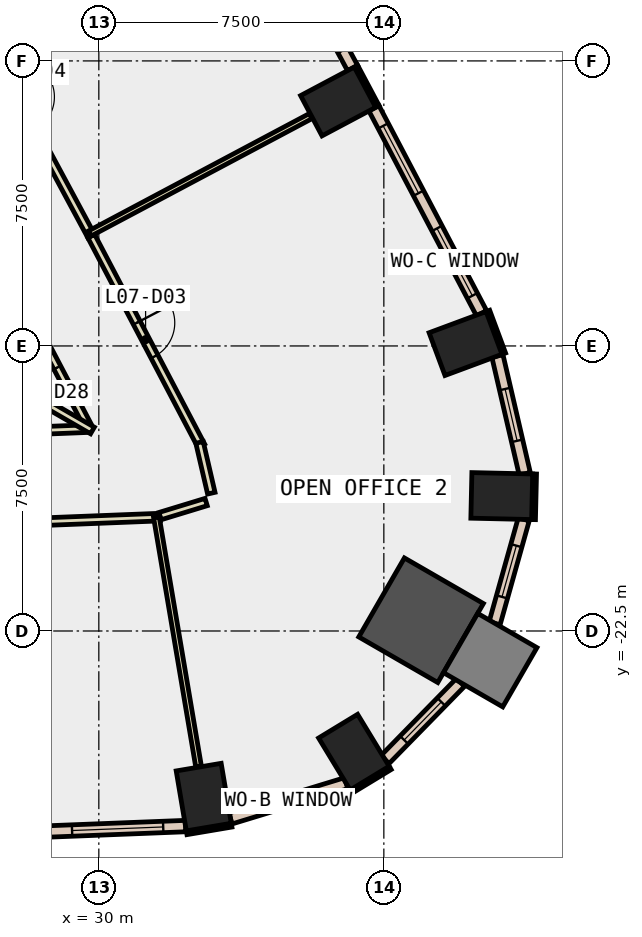
"""IFC4 building model, lengths in metres.
Left out: names, types, materials, properties, quantities, classifications, styles, units other than length and angle.
Written with IfcOpenShell. Run it as: python <this file> out.ifc"""

import sys

from ifc_helpers import new_model, si_unit, direction, frame, frame_2d, origin, origin_2d, place, context, subcontext, project, spatial, rectangle, extrude, element, fill, save


model = new_model("IFC4")
c1 = context("Model", 3, precision=1e-05, world=origin(), true_north=direction((0.0, 1.0)))
c2 = subcontext(c1, "Body", "Model", "MODEL_VIEW")
j1 = project(units=[si_unit("LENGTHUNIT", "METRE"), si_unit("PLANEANGLEUNIT", "RADIAN")], contexts=[c1])
p1 = place(None, origin())
s1 = spatial("IfcSite", under=j1, at=p1, CompositionType="ELEMENT")
p2 = place(p1, origin())
s2 = spatial("IfcBuilding", under=s1, at=p2, CompositionType="ELEMENT")
p3 = place(p2, frame((0.0, 0.0, 39.2)))
s3 = spatial("IfcBuildingStorey", under=s2, at=p3, CompositionType="ELEMENT", Elevation=39.2)
for number, where, z_axis, x_axis in (
    (1, (32.761, -26.871, -0.4), (0.0, 0.0, 1.0), (0.986, 0.167, 0.0)),
    (2, (36.712, -25.688, -0.4), (0.0, 0.0, 1.0), (0.855, 0.519, 0.0)),
):
    element("IfcColumn", number, at=place(p3, frame(where, z_axis=z_axis, x_axis=x_axis)), inside=s3, PredefinedType="COLUMN", context=c2, shape_type="SweptSolid", body=[
        extrude(rectangle(XDim=1.2, YDim=1.6, at=origin_2d()), origin(), (0.0, 0.0, 1.0), 4.2),
    ])
p4 = place(p3, frame((38.48, -22.217, -0.4), z_axis=(0.0, 0.0, 1.0), x_axis=(-0.866025403784, 0.5, 0.0)))
e3 = element("IfcColumn", 3, at=p4, inside=s3, PredefinedType="COLUMN", context=c2, shape_type="SweptSolid", body=[
    extrude(rectangle(XDim=2.4, YDim=2.4, at=origin_2d()), origin(), (0.0, 0.0, 1.0), 4.2),
])
for number, where, z_axis, x_axis in (
    (4, (40.603, -18.95, -0.4), (0.0, 0.0, 1.0), (0.023, 1.0, 0.0)),
    (5, (39.65, -14.936, -0.4), (0.0, 0.0, 1.0), (-0.348, 0.937, 0.0)),
    (6, (36.298, -8.567, -0.4), (0.0, 0.0, 1.0), (-0.469, 0.883, 0.0)),
):
    element("IfcColumn", number, at=place(p3, frame(where, z_axis=z_axis, x_axis=x_axis)), inside=s3, PredefinedType="COLUMN", context=c2, shape_type="SweptSolid", body=[
        extrude(rectangle(XDim=1.2, YDim=1.6, at=origin_2d()), origin(), (0.0, 0.0, 1.0), 4.2),
    ])
p5 = place(p3, frame((40.299, -23.267, -0.4), z_axis=(0.0, 0.0, 1.0), x_axis=(-0.866025403784, 0.5, 0.0)))
e7 = element("IfcColumn", 7, at=p5, inside=s3, PredefinedType="COLUMN", context=c2, shape_type="SweptSolid", body=[
    extrude(rectangle(XDim=1.8, YDim=1.8, at=origin_2d()), origin(), (0.0, 0.0, 1.0), 4.2),
])
p6 = place(p3, frame((40.656, -15.203, 0.0), z_axis=(0.0, 0.0, 1.0), x_axis=(-0.348268249601, 0.937394914814, 0.0)))
e8 = element("IfcWall", 8, at=p6, inside=s3, PredefinedType="STANDARD", context=c2, shape_type="SweptSolid", body=[
    extrude(rectangle(XDim=1.2, YDim=0.1, at=frame_2d((0.6, 0.0))), origin(), (0.0, 0.0, 1.0), 3.8),
])
p7 = place(p3, frame((37.33, -8.698, 0.0), z_axis=(0.0, 0.0, 1.0), x_axis=(-0.469383408131, 0.882994459876, 0.0)))
e9 = element("IfcWall", 9, at=p7, inside=s3, PredefinedType="STANDARD", context=c2, shape_type="SweptSolid", body=[
    extrude(rectangle(XDim=1.199, YDim=0.1, at=frame_2d((0.6, 0.0))), origin(), (0.0, 0.0, 1.0), 3.8),
])
p8 = place(p3, frame((32.311, -27.809, 0.0), z_axis=(0.0, 0.0, 1.0), x_axis=(0.98597830993, 0.166873522011, 0.0)))
e10 = element("IfcWall", 10, at=p8, inside=s3, PredefinedType="STANDARD", context=c2, shape_type="SweptSolid", body=[
    extrude(rectangle(XDim=1.2, YDim=0.1, at=frame_2d((0.6, 0.0))), origin(), (0.0, 0.0, 1.0), 3.8),
])
for number, where, z_axis, x_axis in (
    (11, (36.64, -26.726, 0.0), (0.0, 0.0, 1.0), (0.855, 0.519, 0.0)),
    (12, (41.439, -19.569, 0.0), (0.0, 0.0, 1.0), (0.023, 1.0, 0.0)),
):
    element("IfcWall", number, at=place(p3, frame(where, z_axis=z_axis, x_axis=x_axis)), inside=s3, PredefinedType="STANDARD", context=c2, shape_type="SweptSolid", body=[
        extrude(rectangle(XDim=1.2, YDim=0.1, at=frame_2d((0.6, 0.0))), origin(), (0.0, 0.0, 1.0), 3.8),
    ])
p9 = place(p3, frame((25.134, -27.914, 0.0), z_axis=(0.0, 0.0, 1.0), x_axis=(0.999228146648, 0.039282450878, 0.0)))
e13 = element("IfcWall", 13, at=p9, inside=s3, PredefinedType="STANDARD", context=c2, shape_type="SweptSolid", body=[
    extrude(rectangle(XDim=7.154, YDim=0.3, at=frame_2d((3.577, 0.0))), origin(), (0.0, 0.0, 1.0), 3.8),
])
p10 = place(p9, frame((0.588, 0.0, 0.9)))
e14 = element("IfcOpeningElement", 14, at=p10, cuts=e13, PredefinedType="OPENING", context=c2, shape_type="SweptSolid", body=[
    extrude(rectangle(XDim=2.4, YDim=2.6, at=frame_2d((1.2, 1.3))), frame((0.0, 0.16, 0.0), z_axis=(0.0, -1.0, 0.0), x_axis=(1.0, 0.0, 0.0)), (0.0, 0.0, 1.0), 0.32),
])
p11 = place(p9, frame((4.165, 0.0, 0.9)))
e15 = element("IfcOpeningElement", 15, at=p11, cuts=e13, PredefinedType="OPENING", context=c2, shape_type="SweptSolid", body=[
    extrude(rectangle(XDim=2.4, YDim=2.6, at=frame_2d((1.2, 1.3))), frame((0.0, 0.16, 0.0), z_axis=(0.0, -1.0, 0.0), x_axis=(1.0, 0.0, 0.0)), (0.0, 0.0, 1.0), 0.32),
])
p12 = place(p3, frame((33.464, -27.433, 0.0), z_axis=(0.0, 0.0, 1.0), x_axis=(0.95648967224, 0.291766185322, 0.0)))
e16 = element("IfcWall", 16, at=p12, inside=s3, PredefinedType="STANDARD", context=c2, shape_type="SweptSolid", body=[
    extrude(rectangle(XDim=3.181, YDim=0.3, at=frame_2d((1.591, 0.0))), origin(), (0.0, 0.0, 1.0), 3.8),
])
p13 = place(p12, frame((0.891, 0.0, 0.9)))
e17 = element("IfcOpeningElement", 17, at=p13, cuts=e16, PredefinedType="OPENING", context=c2, shape_type="SweptSolid", body=[
    extrude(rectangle(XDim=1.4, YDim=2.6, at=frame_2d((0.7, 1.3))), frame((0.0, 0.16, 0.0), z_axis=(0.0, -1.0, 0.0), x_axis=(1.0, 0.0, 0.0)), (0.0, 0.0, 1.0), 0.32),
])
p14 = place(p3, frame((37.531, -25.883, 0.0), z_axis=(0.0, 0.0, 1.0), x_axis=(0.699151821451, 0.714973237654, 0.0)))
e18 = element("IfcWall", 18, at=p14, inside=s3, PredefinedType="STANDARD", context=c2, shape_type="SweptSolid", body=[
    extrude(rectangle(XDim=2.839, YDim=0.3, at=frame_2d((1.42, 0.0))), origin(), (0.0, 0.0, 1.0), 3.8),
])
p15 = place(p14, frame((0.72, 0.0, 0.9)))
e19 = element("IfcOpeningElement", 19, at=p15, cuts=e18, PredefinedType="OPENING", context=c2, shape_type="SweptSolid", body=[
    extrude(rectangle(XDim=1.4, YDim=2.6, at=frame_2d((0.7, 1.3))), frame((0.0, 0.16, 0.0), z_axis=(0.0, -1.0, 0.0), x_axis=(1.0, 0.0, 0.0)), (0.0, 0.0, 1.0), 0.32),
])
p16 = place(p3, frame((40.415, -22.296, 0.0), z_axis=(0.0, 0.0, 1.0), x_axis=(0.269754317033, 0.962929181426, 0.0)))
e20 = element("IfcWall", 20, at=p16, inside=s3, PredefinedType="STANDARD", context=c2, shape_type="SweptSolid", body=[
    extrude(rectangle(XDim=2.839, YDim=0.3, at=frame_2d((1.419, 0.0))), origin(), (0.0, 0.0, 1.0), 3.8),
])
p17 = place(p16, frame((0.72, 0.0, 0.9)))
e21 = element("IfcOpeningElement", 21, at=p17, cuts=e20, PredefinedType="OPENING", context=c2, shape_type="SweptSolid", body=[
    extrude(rectangle(XDim=1.4, YDim=2.6, at=frame_2d((0.7, 1.3))), frame((0.0, 0.16, 0.0), z_axis=(0.0, -1.0, 0.0), x_axis=(1.0, 0.0, 0.0)), (0.0, 0.0, 1.0), 0.32),
])
p18 = place(p3, frame((41.208, -18.364, 0.0), z_axis=(0.0, 0.0, 1.0), x_axis=(-0.225929520451, 0.974143650489, 0.0)))
e22 = element("IfcWall", 22, at=p18, inside=s3, PredefinedType="STANDARD", context=c2, shape_type="SweptSolid", body=[
    extrude(rectangle(XDim=3.182, YDim=0.3, at=frame_2d((1.591, 0.0))), origin(), (0.0, 0.0, 1.0), 3.8),
])
p19 = place(p18, frame((0.891, 0.0, 0.9)))
e23 = element("IfcOpeningElement", 23, at=p19, cuts=e22, PredefinedType="OPENING", context=c2, shape_type="SweptSolid", body=[
    extrude(rectangle(XDim=1.4, YDim=2.6, at=frame_2d((0.7, 1.3))), frame((0.0, 0.16, 0.0), z_axis=(0.0, -1.0, 0.0), x_axis=(1.0, 0.0, 0.0)), (0.0, 0.0, 1.0), 0.32),
])
p20 = place(p3, frame((40.072, -14.141, 0.0), z_axis=(0.0, 0.0, 1.0), x_axis=(-0.464913987781, 0.885355851602, 0.0)))
e24 = element("IfcWall", 24, at=p20, inside=s3, PredefinedType="STANDARD", context=c2, shape_type="SweptSolid", body=[
    extrude(rectangle(XDim=6.094, YDim=0.3, at=frame_2d((3.047, 0.0))), origin(), (0.0, 0.0, 1.0), 3.8),
])
p21 = place(p20, frame((0.523, 0.0, 0.9)))
e25 = element("IfcOpeningElement", 25, at=p21, cuts=e24, PredefinedType="OPENING", context=c2, shape_type="SweptSolid", body=[
    extrude(rectangle(XDim=2.0, YDim=2.6, at=frame_2d((1.0, 1.3))), frame((0.0, 0.16, 0.0), z_axis=(0.0, -1.0, 0.0), x_axis=(1.0, 0.0, 0.0)), (0.0, 0.0, 1.0), 0.32),
])
p22 = place(p20, frame((3.57, 0.0, 0.9)))
e26 = element("IfcOpeningElement", 26, at=p22, cuts=e24, PredefinedType="OPENING", context=c2, shape_type="SweptSolid", body=[
    extrude(rectangle(XDim=2.0, YDim=2.6, at=frame_2d((1.0, 1.3))), frame((0.0, 0.16, 0.0), z_axis=(0.0, -1.0, 0.0), x_axis=(1.0, 0.0, 0.0)), (0.0, 0.0, 1.0), 0.32),
])
p23 = place(p3, frame((36.677, -7.688, 0.0), z_axis=(0.0, 0.0, 1.0), x_axis=(-0.47375467653, 0.880656860795, 0.0)))
e27 = element("IfcWall", 27, at=p23, inside=s3, PredefinedType="STANDARD", context=c2, shape_type="SweptSolid", body=[
    extrude(rectangle(XDim=6.117, YDim=0.3, at=frame_2d((3.059, 0.0))), origin(), (0.0, 0.0, 1.0), 3.8),
])
p24 = place(p23, frame((0.529, 0.0, 0.9)))
e28 = element("IfcOpeningElement", 28, at=p24, cuts=e27, PredefinedType="OPENING", context=c2, shape_type="SweptSolid", body=[
    extrude(rectangle(XDim=2.0, YDim=2.6, at=frame_2d((1.0, 1.3))), frame((0.0, 0.16, 0.0), z_axis=(0.0, -1.0, 0.0), x_axis=(1.0, 0.0, 0.0)), (0.0, 0.0, 1.0), 0.32),
])
p25 = place(p23, frame((3.588, 0.0, 0.9)))
e29 = element("IfcOpeningElement", 29, at=p25, cuts=e27, PredefinedType="OPENING", context=c2, shape_type="SweptSolid", body=[
    extrude(rectangle(XDim=2.0, YDim=2.6, at=frame_2d((1.0, 1.3))), frame((0.0, 0.16, 0.0), z_axis=(0.0, -1.0, 0.0), x_axis=(1.0, 0.0, 0.0)), (0.0, 0.0, 1.0), 0.32),
])
p26 = place(p3, frame((24.18, -17.393, 0.0), z_axis=(0.0, 0.0, 1.0), x_axis=(0.999226657848, 0.039320303228, 0.0)))
e30 = element("IfcWall", 30, at=p26, inside=s3, PredefinedType="PARTITIONING", context=c2, shape_type="SweptSolid", body=[
    extrude(rectangle(XDim=5.57, YDim=0.2, at=frame_2d((2.785, 0.0))), origin(), (0.0, 0.0, 1.0), 3.8),
])
p27 = place(p26, frame((2.284, 0.0, 0.0)))
e31 = element("IfcOpeningElement", 31, at=p27, cuts=e30, PredefinedType="OPENING", context=c2, shape_type="SweptSolid", body=[
    extrude(rectangle(XDim=1.0, YDim=2.1, at=frame_2d((0.5, 1.05))), frame((0.0, 0.11, 0.0), z_axis=(0.0, -1.0, 0.0), x_axis=(1.0, 0.0, 0.0)), (0.0, 0.0, 1.0), 0.22),
])
p28 = place(p3, frame((29.702, -17.085, 0.0), z_axis=(0.0, 0.0, 1.0), x_axis=(-0.464998228159, 0.88531161057, 0.0)))
e32 = element("IfcWall", 32, at=p28, inside=s3, PredefinedType="PARTITIONING", context=c2, shape_type="SweptSolid", body=[
    extrude(rectangle(XDim=4.426, YDim=0.2, at=frame_2d((2.213, 0.0))), origin(), (0.0, 0.0, 1.0), 3.8),
])
p29 = place(p28, frame((1.713, 0.0, 0.0)))
e33 = element("IfcOpeningElement", 33, at=p29, cuts=e32, PredefinedType="OPENING", context=c2, shape_type="SweptSolid", body=[
    extrude(rectangle(XDim=1.0, YDim=2.1, at=frame_2d((0.5, 1.05))), frame((0.0, 0.11, 0.0), z_axis=(0.0, -1.0, 0.0), x_axis=(1.0, 0.0, 0.0)), (0.0, 0.0, 1.0), 0.22),
])
p30 = place(p3, frame((31.615, -19.503, 0.0), z_axis=(0.0, 0.0, 1.0), x_axis=(-0.999228381006, -0.039276489048, 0.0)))
e34 = element("IfcWall", 34, at=p30, inside=s3, PredefinedType="PARTITIONING", context=c2, shape_type="SweptSolid", body=[
    extrude(rectangle(XDim=7.36, YDim=0.2, at=frame_2d((3.68, 0.0))), origin(), (0.0, 0.0, 1.0), 3.8),
])
p31 = place(p3, frame((29.799, -12.107, 0.0), z_axis=(0.0, 0.0, 1.0), x_axis=(0.464767882002, -0.885432558617, 0.0)))
e35 = element("IfcWall", 35, at=p31, inside=s3, PredefinedType="PARTITIONING", context=c2, shape_type="SweptSolid", body=[
    extrude(rectangle(XDim=6.233, YDim=0.2, at=frame_2d((3.117, 0.0))), origin(), (0.0, 0.0, 1.0), 3.8),
])
p32 = place(p31, frame((2.58, 0.0, 0.0)))
e36 = element("IfcOpeningElement", 36, at=p32, cuts=e35, PredefinedType="OPENING", context=c2, shape_type="SweptSolid", body=[
    extrude(rectangle(XDim=1.0, YDim=2.1, at=frame_2d((0.5, 1.05))), frame((0.0, 0.11, 0.0), z_axis=(0.0, -1.0, 0.0), x_axis=(1.0, 0.0, 0.0)), (0.0, 0.0, 1.0), 0.22),
])
p33 = place(p3, frame((32.65, -17.538, 0.0), z_axis=(0.0, 0.0, 1.0), x_axis=(0.226081445763, -0.974108402531, 0.0)))
e37 = element("IfcWall", 37, at=p33, inside=s3, PredefinedType="PARTITIONING", context=c2, shape_type="SweptSolid", body=[
    extrude(rectangle(XDim=1.371, YDim=0.2, at=frame_2d((0.686, 0.0))), origin(), (0.0, 0.0, 1.0), 3.8),
])
p34 = place(p3, frame((32.824, -19.107, 0.0), z_axis=(0.0, 0.0, 1.0), x_axis=(-0.956459113118, -0.291866347723, 0.0)))
e38 = element("IfcWall", 38, at=p34, inside=s3, PredefinedType="PARTITIONING", context=c2, shape_type="SweptSolid", body=[
    extrude(rectangle(XDim=1.268, YDim=0.2, at=frame_2d((0.634, 0.0))), origin(), (0.0, 0.0, 1.0), 3.8),
])
p35 = place(p3, frame((26.337, -5.671, 0.0), z_axis=(0.0, 0.0, 1.0), x_axis=(0.473794961698, -0.880635187958, 0.0)))
e39 = element("IfcWall", 39, at=p35, inside=s3, PredefinedType="PARTITIONING", context=c2, shape_type="SweptSolid", body=[
    extrude(rectangle(XDim=7.307, YDim=0.2, at=frame_2d((3.654, 0.0))), origin(), (0.0, 0.0, 1.0), 3.8),
])
p36 = place(p35, frame((3.154, 0.0, 0.0)))
e40 = element("IfcOpeningElement", 40, at=p36, cuts=e39, PredefinedType="OPENING", context=c2, shape_type="SweptSolid", body=[
    extrude(rectangle(XDim=1.0, YDim=2.1, at=frame_2d((0.5, 1.05))), frame((0.0, 0.11, 0.0), z_axis=(0.0, -1.0, 0.0), x_axis=(1.0, 0.0, 0.0)), (0.0, 0.0, 1.0), 0.22),
])
p37 = place(p3, frame((24.811, -14.326, 0.0), z_axis=(0.0, 0.0, 1.0), x_axis=(0.866076195524, -0.499912015806, 0.0)))
e41 = element("IfcWall", 41, at=p37, inside=s3, PredefinedType="PARTITIONING", context=c2, shape_type="SweptSolid", body=[
    extrude(rectangle(XDim=5.797, YDim=0.2, at=frame_2d((2.899, 0.0))), origin(), (0.0, 0.0, 1.0), 3.8),
])
p38 = place(p3, frame((31.515, -19.506, 0.0), z_axis=(0.0, 0.0, 1.0), x_axis=(0.166785823947, -0.985993148521, 0.0)))
e42 = element("IfcWall", 42, at=p38, inside=s3, PredefinedType="PARTITIONING", context=c2, shape_type="SweptSolid", body=[
    extrude(rectangle(XDim=6.65, YDim=0.15, at=frame_2d((3.325, 0.0))), origin(), (0.0, 0.0, 1.0), 3.8),
])
p39 = place(p3, frame((29.764, -12.04, 0.0), z_axis=(0.0, 0.0, 1.0), x_axis=(0.883018657393, 0.469337885426, 0.0)))
e43 = element("IfcWall", 43, at=p39, inside=s3, PredefinedType="PARTITIONING", context=c2, shape_type="SweptSolid", body=[
    extrude(rectangle(XDim=6.58, YDim=0.15, at=frame_2d((3.29, 0.0))), origin(), (0.0, 0.0, 1.0), 3.8),
])
p40 = place(p11, origin())
e44 = element("IfcWindow", 44, at=p40, inside=s3, PartitioningType="SINGLE_PANEL", PredefinedType="WINDOW", context=c2, shape_type="SweptSolid", body=[
    extrude(rectangle(XDim=2.4, YDim=2.6, at=frame_2d((1.2, 1.3))), frame((0.0, 0.03, 0.0), z_axis=(0.0, -1.0, 0.0), x_axis=(1.0, 0.0, 0.0)), (0.0, 0.0, 1.0), 0.06),
])
fill(e15, e44)
p41 = place(p13, origin())
e45 = element("IfcWindow", 45, at=p41, inside=s3, PartitioningType="SINGLE_PANEL", PredefinedType="WINDOW", context=c2, shape_type="SweptSolid", body=[
    extrude(rectangle(XDim=1.4, YDim=2.6, at=frame_2d((0.7, 1.3))), frame((0.0, 0.03, 0.0), z_axis=(0.0, -1.0, 0.0), x_axis=(1.0, 0.0, 0.0)), (0.0, 0.0, 1.0), 0.06),
])
fill(e17, e45)
p42 = place(p15, origin())
e46 = element("IfcWindow", 46, at=p42, inside=s3, PartitioningType="SINGLE_PANEL", PredefinedType="WINDOW", context=c2, shape_type="SweptSolid", body=[
    extrude(rectangle(XDim=1.4, YDim=2.6, at=frame_2d((0.7, 1.3))), frame((0.0, 0.03, 0.0), z_axis=(0.0, -1.0, 0.0), x_axis=(1.0, 0.0, 0.0)), (0.0, 0.0, 1.0), 0.06),
])
fill(e19, e46)
p43 = place(p17, origin())
e47 = element("IfcWindow", 47, at=p43, inside=s3, PartitioningType="SINGLE_PANEL", PredefinedType="WINDOW", context=c2, shape_type="SweptSolid", body=[
    extrude(rectangle(XDim=1.4, YDim=2.6, at=frame_2d((0.7, 1.3))), frame((0.0, 0.03, 0.0), z_axis=(0.0, -1.0, 0.0), x_axis=(1.0, 0.0, 0.0)), (0.0, 0.0, 1.0), 0.06),
])
fill(e21, e47)
p44 = place(p19, origin())
e48 = element("IfcWindow", 48, at=p44, inside=s3, PartitioningType="SINGLE_PANEL", PredefinedType="WINDOW", context=c2, shape_type="SweptSolid", body=[
    extrude(rectangle(XDim=1.4, YDim=2.6, at=frame_2d((0.7, 1.3))), frame((0.0, 0.03, 0.0), z_axis=(0.0, -1.0, 0.0), x_axis=(1.0, 0.0, 0.0)), (0.0, 0.0, 1.0), 0.06),
])
fill(e23, e48)
p45 = place(p21, origin())
e49 = element("IfcWindow", 49, at=p45, inside=s3, PartitioningType="SINGLE_PANEL", PredefinedType="WINDOW", context=c2, shape_type="SweptSolid", body=[
    extrude(rectangle(XDim=2.0, YDim=2.6, at=frame_2d((1.0, 1.3))), frame((0.0, 0.03, 0.0), z_axis=(0.0, -1.0, 0.0), x_axis=(1.0, 0.0, 0.0)), (0.0, 0.0, 1.0), 0.06),
])
fill(e25, e49)
p46 = place(p22, origin())
e50 = element("IfcWindow", 50, at=p46, inside=s3, PartitioningType="SINGLE_PANEL", PredefinedType="WINDOW", context=c2, shape_type="SweptSolid", body=[
    extrude(rectangle(XDim=2.0, YDim=2.6, at=frame_2d((1.0, 1.3))), frame((0.0, 0.03, 0.0), z_axis=(0.0, -1.0, 0.0), x_axis=(1.0, 0.0, 0.0)), (0.0, 0.0, 1.0), 0.06),
])
fill(e26, e50)
p47 = place(p32, origin())
e51 = element("IfcDoor", 51, at=p47, inside=s3, OperationType="SINGLE_SWING_LEFT", PredefinedType="DOOR", context=c2, shape_type="SweptSolid", body=[
    extrude(rectangle(XDim=1.0, YDim=2.1, at=frame_2d((0.5, 1.05))), frame((0.0, 0.025, 0.0), z_axis=(0.0, -1.0, 0.0), x_axis=(1.0, 0.0, 0.0)), (0.0, 0.0, 1.0), 0.05),
])
fill(e36, e51)
p48 = place(p29, origin())
e52 = element("IfcDoor", 52, at=p48, inside=s3, OperationType="SINGLE_SWING_LEFT", PredefinedType="DOOR", context=c2, shape_type="SweptSolid", body=[
    extrude(rectangle(XDim=1.0, YDim=2.1, at=frame_2d((0.5, 1.05))), frame((0.0, 0.025, 0.0), z_axis=(0.0, -1.0, 0.0), x_axis=(1.0, 0.0, 0.0)), (0.0, 0.0, 1.0), 0.05),
])
fill(e33, e52)
save(model, sys.argv[1])
